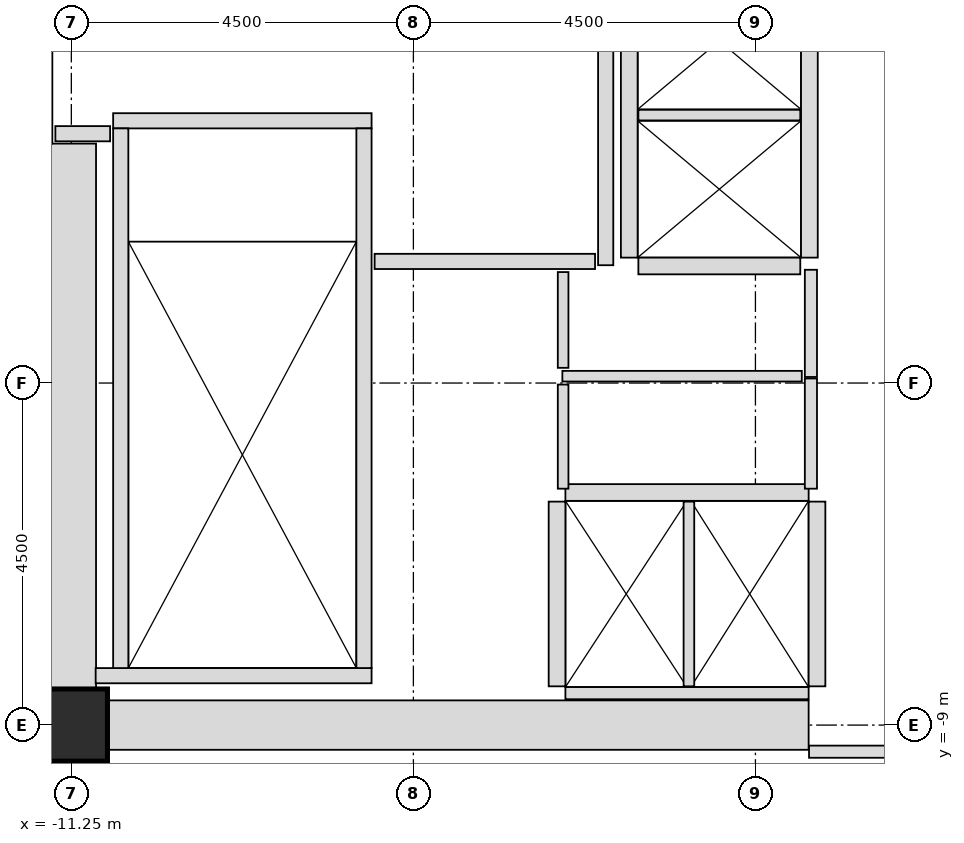
"""IFC4 building model, lengths in metres.
Left out: names, types, materials, properties, quantities, classifications, styles, units other than length and angle.
Written with IfcOpenShell. Run it as: python <this file> out.ifc"""

import sys

from ifc_helpers import new_model, si_unit, direction, frame, frame_2d, origin, origin_2d, place, context, subcontext, project, spatial, rectangle, hollow_rectangle, extrude, source, transform, mapped, element, fill, save


model = new_model("IFC4")
c1 = context("Model", 3, precision=1e-05, world=origin(), true_north=direction((0.0, 1.0)))
c2 = subcontext(c1, "Body", "Model", "MODEL_VIEW")
j1 = project(units=[si_unit("LENGTHUNIT", "METRE"), si_unit("PLANEANGLEUNIT", "RADIAN")], contexts=[c1])
p1 = place(None, origin())
s1 = spatial("IfcSite", under=j1, at=p1, CompositionType="ELEMENT")
p2 = place(p1, origin())
s2 = spatial("IfcBuilding", under=s1, at=p2, CompositionType="ELEMENT")
p3 = place(p2, frame((0.0, 0.0, 40.6)))
s3 = spatial("IfcBuildingStorey", under=s2, at=p3, CompositionType="ELEMENT", Elevation=40.6)
m1 = source(origin(), c2, "Body", "SweptSolid", [
    extrude(rectangle(XDim=10.025, YDim=0.65, at=frame_2d((5.012, 0.0))), origin(), (0.0, 0.0, 1.0), 3.8),
])
p4 = place(p3, frame((-11.575, -9.0, 0.0), z_axis=(0.0, 0.0, 1.0), x_axis=(1.0, 0.0, 0.0)))
e1 = element("IfcWall", 1, at=p4, inside=s3, PredefinedType="SHEAR", context=c2, shape_type="MappedRepresentation", body=[
    mapped(m1, transform((0.0, 0.0, 0.0), x_axis=(1.0, 0.0, 0.0), y_axis=(0.0, 1.0, 0.0), z_axis=(0.0, 0.0, 1.0), scale=1.0)),
])
m2 = source(origin(), c2, "Body", "SweptSolid", [
    extrude(rectangle(XDim=7.325, YDim=0.65, at=frame_2d((3.663, 0.0))), origin(), (0.0, 0.0, 1.0), 3.8),
])
p5 = place(p3, frame((-11.25, -8.675, 0.0), z_axis=(0.0, 0.0, 1.0), x_axis=(0.0, 1.0, 0.0)))
e2 = element("IfcWall", 2, at=p5, inside=s3, PredefinedType="SHEAR", context=c2, shape_type="MappedRepresentation", body=[
    mapped(m2, transform((0.0, 0.0, 0.0), x_axis=(1.0, 0.0, 0.0), y_axis=(0.0, 1.0, 0.0), z_axis=(0.0, 0.0, 1.0), scale=1.0)),
])
m3 = source(origin(), c2, "Body", "SweptSolid", [
    extrude(hollow_rectangle(XDim=0.95, YDim=0.95, WallThickness=0.045, InnerFilletRadius=0.045, OuterFilletRadius=0.09, at=origin_2d()), origin(), (0.0, 0.0, 1.0), 3.8),
])
p6 = place(p3, frame((-11.25, -9.0, 0.0), z_axis=(0.0, 0.0, 1.0), x_axis=(1.0, 0.0, 0.0)))
e3 = element("IfcColumn", 3, at=p6, inside=s3, PredefinedType="COLUMN", context=c2, shape_type="MappedRepresentation", body=[
    mapped(m3, transform((0.0, 0.0, 0.0), x_axis=(1.0, 0.0, 0.0), y_axis=(0.0, 1.0, 0.0), z_axis=(0.0, 0.0, 1.0), scale=1.0)),
])
m4 = source(origin(), c2, "Body", "SweptSolid", [
    extrude(rectangle(XDim=3.4, YDim=0.2, at=frame_2d((1.7, 0.0))), origin(), (0.0, 0.0, 1.0), 3.8),
])
p7 = place(p3, frame((-10.7, -1.05, 0.0), z_axis=(0.0, 0.0, 1.0), x_axis=(1.0, 0.0, 0.0)))
e4 = element("IfcWall", 4, at=p7, inside=s3, PredefinedType="SOLIDWALL", context=c2, shape_type="MappedRepresentation", body=[
    mapped(m4, transform((0.0, 0.0, 0.0), x_axis=(1.0, 0.0, 0.0), y_axis=(0.0, 1.0, 0.0), z_axis=(0.0, 0.0, 1.0), scale=1.0)),
])
m5 = source(origin(), c2, "Body", "SweptSolid", [
    extrude(rectangle(XDim=3.63, YDim=0.2, at=frame_2d((1.815, 0.0))), origin(), (0.0, 0.0, 1.0), 3.8),
])
p8 = place(p3, frame((-10.93, -8.35, 0.0), z_axis=(0.0, 0.0, 1.0), x_axis=(1.0, 0.0, 0.0)))
e5 = element("IfcWall", 5, at=p8, inside=s3, PredefinedType="SOLIDWALL", context=c2, shape_type="MappedRepresentation", body=[
    mapped(m5, transform((0.0, 0.0, 0.0), x_axis=(1.0, 0.0, 0.0), y_axis=(0.0, 1.0, 0.0), z_axis=(0.0, 0.0, 1.0), scale=1.0)),
])
m6 = source(origin(), c2, "Body", "SweptSolid", [
    extrude(rectangle(XDim=7.1, YDim=0.2, at=frame_2d((3.55, 0.0))), origin(), (0.0, 0.0, 1.0), 3.8),
])
p9 = place(p3, frame((-10.6, -1.15, 0.0), z_axis=(0.0, 0.0, 1.0), x_axis=(0.0, -1.0, 0.0)))
e6 = element("IfcWall", 6, at=p9, inside=s3, PredefinedType="SOLIDWALL", context=c2, shape_type="MappedRepresentation", body=[
    mapped(m6, transform((0.0, 0.0, 0.0), x_axis=(1.0, 0.0, 0.0), y_axis=(0.0, 1.0, 0.0), z_axis=(0.0, 0.0, 1.0), scale=1.0)),
])
p10 = place(p3, frame((-7.4, -1.15, 0.0), z_axis=(0.0, 0.0, 1.0), x_axis=(0.0, -1.0, 0.0)))
e7 = element("IfcWall", 7, at=p10, inside=s3, PredefinedType="SOLIDWALL", context=c2, shape_type="MappedRepresentation", body=[
    mapped(m6, transform((0.0, 0.0, 0.0), x_axis=(1.0, 0.0, 0.0), y_axis=(0.0, 1.0, 0.0), z_axis=(0.0, 0.0, 1.0), scale=1.0)),
])
p11 = place(p10, frame((0.18, 0.0, 0.0)))
e8 = element("IfcOpeningElement", 8, at=p11, cuts=e7, PredefinedType="OPENING", context=c2, shape_type="SweptSolid", body=[
    extrude(rectangle(XDim=1.1, YDim=2.15, at=frame_2d((0.55, 1.075))), frame((0.0, 0.11, 0.0), z_axis=(0.0, -1.0, 0.0), x_axis=(1.0, 0.0, 0.0)), (0.0, 0.0, 1.0), 0.22),
])
m7 = source(origin(), c2, "Body", "SweptSolid", [
    extrude(rectangle(XDim=3.2, YDim=0.22, at=frame_2d((1.6, 0.0))), origin(), (0.0, 0.0, 1.0), 3.535),
])
p12 = place(p3, frame((-1.55, -5.94, 0.0), z_axis=(0.0, 0.0, 1.0), x_axis=(-1.0, 0.0, 0.0)))
e9 = element("IfcWall", 9, at=p12, inside=s3, PredefinedType="SOLIDWALL", context=c2, shape_type="MappedRepresentation", body=[
    mapped(m7, transform((0.0, 0.0, 0.0), x_axis=(1.0, 0.0, 0.0), y_axis=(0.0, 1.0, 0.0), z_axis=(0.0, 0.0, 1.0), scale=1.0)),
])
m8 = source(origin(), c2, "Body", "SweptSolid", [
    extrude(rectangle(XDim=3.2, YDim=0.16, at=frame_2d((1.6, 0.0))), origin(), (0.0, 0.0, 1.0), 2.425),
])
p13 = place(p3, frame((-4.75, -8.58, 0.0), z_axis=(0.0, 0.0, 1.0), x_axis=(1.0, 0.0, 0.0)))
e10 = element("IfcWall", 10, at=p13, inside=s3, PredefinedType="PARTITIONING", context=c2, shape_type="MappedRepresentation", body=[
    mapped(m8, transform((0.0, 0.0, 0.0), x_axis=(1.0, 0.0, 0.0), y_axis=(0.0, 1.0, 0.0), z_axis=(0.0, 0.0, 1.0), scale=1.0)),
])
m9 = source(origin(), c2, "Body", "SweptSolid", [
    extrude(rectangle(XDim=2.43, YDim=0.22, at=frame_2d((1.215, 0.0))), origin(), (0.0, 0.0, 1.0), 3.535),
])
p14 = place(p3, frame((-4.86, -6.06, 0.0), z_axis=(0.0, 0.0, 1.0), x_axis=(0.0, -1.0, 0.0)))
e11 = element("IfcWall", 11, at=p14, inside=s3, PredefinedType="SOLIDWALL", context=c2, shape_type="MappedRepresentation", body=[
    mapped(m9, transform((0.0, 0.0, 0.0), x_axis=(1.0, 0.0, 0.0), y_axis=(0.0, 1.0, 0.0), z_axis=(0.0, 0.0, 1.0), scale=1.0)),
])
m10 = source(origin(), c2, "Body", "SweptSolid", [
    extrude(rectangle(XDim=2.43, YDim=0.14, at=frame_2d((1.215, 0.0))), origin(), (0.0, 0.0, 1.0), 3.535),
])
p15 = place(p3, frame((-3.125, -8.49, 0.0), z_axis=(0.0, 0.0, 1.0), x_axis=(0.0, 1.0, 0.0)))
e12 = element("IfcWall", 12, at=p15, inside=s3, PredefinedType="PARTITIONING", context=c2, shape_type="MappedRepresentation", body=[
    mapped(m10, transform((0.0, 0.0, 0.0), x_axis=(1.0, 0.0, 0.0), y_axis=(0.0, 1.0, 0.0), z_axis=(0.0, 0.0, 1.0), scale=1.0)),
])
p16 = place(p3, frame((-1.44, -8.49, 0.0), z_axis=(0.0, 0.0, 1.0), x_axis=(0.0, 1.0, 0.0)))
e13 = element("IfcWall", 13, at=p16, inside=s3, PredefinedType="SOLIDWALL", context=c2, shape_type="MappedRepresentation", body=[
    mapped(m9, transform((0.0, 0.0, 0.0), x_axis=(1.0, 0.0, 0.0), y_axis=(0.0, 1.0, 0.0), z_axis=(0.0, 0.0, 1.0), scale=1.0)),
])
m11 = source(origin(), c2, "Body", "SweptSolid", [
    extrude(rectangle(XDim=5.7, YDim=0.22, at=frame_2d((2.85, 0.0))), origin(), (0.0, 0.0, 1.0), 3.535),
])
for number, where, z_axis, x_axis in (
    (14, (-1.54, -2.85, 0.0), (0.0, 0.0, 1.0), (0.0, 1.0, 0.0)),
    (15, (-3.91, 2.85, 0.0), (0.0, 0.0, 1.0), (0.0, -1.0, 0.0)),
):
    element("IfcWall", number, at=place(p3, frame(where, z_axis=z_axis, x_axis=x_axis)), inside=s3, PredefinedType="SOLIDWALL", context=c2, shape_type="MappedRepresentation", body=[
        mapped(m11, transform((0.0, 0.0, 0.0), x_axis=(1.0, 0.0, 0.0), y_axis=(0.0, 1.0, 0.0), z_axis=(0.0, 0.0, 1.0), scale=1.0)),
    ])
m12 = source(origin(), c2, "Body", "SweptSolid", [
    extrude(rectangle(XDim=2.13, YDim=0.22, at=frame_2d((1.065, 0.0))), origin(), (0.0, 0.0, 1.0), 3.535),
])
p17 = place(p3, frame((-3.79, -2.96, 0.0), z_axis=(0.0, 0.0, 1.0), x_axis=(1.0, 0.0, 0.0)))
e16 = element("IfcWall", 16, at=p17, inside=s3, PredefinedType="SOLIDWALL", context=c2, shape_type="MappedRepresentation", body=[
    mapped(m12, transform((0.0, 0.0, 0.0), x_axis=(1.0, 0.0, 0.0), y_axis=(0.0, 1.0, 0.0), z_axis=(0.0, 0.0, 1.0), scale=1.0)),
])
m13 = source(origin(), c2, "Body", "SweptSolid", [
    extrude(rectangle(XDim=2.13, YDim=0.14, at=frame_2d((1.065, 0.0))), origin(), (0.0, 0.0, 1.0), 3.535),
])
p18 = place(p3, frame((-3.79, -0.975, 0.0), z_axis=(0.0, 0.0, 1.0), x_axis=(1.0, 0.0, 0.0)))
e17 = element("IfcWall", 17, at=p18, inside=s3, PredefinedType="PARTITIONING", context=c2, shape_type="MappedRepresentation", body=[
    mapped(m13, transform((0.0, 0.0, 0.0), x_axis=(1.0, 0.0, 0.0), y_axis=(0.0, 1.0, 0.0), z_axis=(0.0, 0.0, 1.0), scale=1.0)),
])
m14 = source(origin(), c2, "Body", "SweptSolid", [
    extrude(rectangle(XDim=5.9, YDim=0.2, at=frame_2d((2.95, 0.0))), origin(), (0.0, 0.0, 1.0), 3.535),
])
p19 = place(p3, frame((-4.22, -2.95, 0.0), z_axis=(0.0, 0.0, 1.0), x_axis=(0.0, 1.0, 0.0)))
e18 = element("IfcWall", 18, at=p19, inside=s3, PredefinedType="PARTITIONING", context=c2, shape_type="MappedRepresentation", body=[
    mapped(m14, transform((0.0, 0.0, 0.0), x_axis=(1.0, 0.0, 0.0), y_axis=(0.0, 1.0, 0.0), z_axis=(0.0, 0.0, 1.0), scale=1.0)),
])
m15 = source(origin(), c2, "Body", "SweptSolid", [
    extrude(rectangle(XDim=2.9, YDim=0.2, at=frame_2d((1.45, 0.0))), origin(), (0.0, 0.0, 1.0), 3.535),
])
p20 = place(p3, frame((-7.26, -2.9, 0.0), z_axis=(0.0, 0.0, 1.0), x_axis=(1.0, 0.0, 0.0)))
e19 = element("IfcWall", 19, at=p20, inside=s3, PredefinedType="PARTITIONING", context=c2, shape_type="MappedRepresentation", body=[
    mapped(m15, transform((0.0, 0.0, 0.0), x_axis=(1.0, 0.0, 0.0), y_axis=(0.0, 1.0, 0.0), z_axis=(0.0, 0.0, 1.0), scale=1.0)),
])
m16 = source(origin(), c2, "Body", "SweptSolid", [
    extrude(rectangle(XDim=0.72, YDim=0.2, at=frame_2d((0.36, 0.0))), origin(), (0.0, 0.0, 1.0), 3.535),
])
p21 = place(p3, frame((-11.46, -1.22, 0.0), z_axis=(0.0, 0.0, 1.0), x_axis=(1.0, 0.0, 0.0)))
e20 = element("IfcWall", 20, at=p21, inside=s3, PredefinedType="PARTITIONING", context=c2, shape_type="MappedRepresentation", body=[
    mapped(m16, transform((0.0, 0.0, 0.0), x_axis=(1.0, 0.0, 0.0), y_axis=(0.0, 1.0, 0.0), z_axis=(0.0, 0.0, 1.0), scale=1.0)),
])
m17 = source(origin(), c2, "Body", "SweptSolid", [
    extrude(rectangle(XDim=3.09, YDim=0.16, at=frame_2d((1.545, 0.0))), origin(), (0.0, 0.0, 1.0), 2.425),
])
p22 = place(p3, frame((-1.545, -9.35, 0.0), z_axis=(0.0, 0.0, 1.0), x_axis=(1.0, 0.0, 0.0)))
e21 = element("IfcWall", 21, at=p22, inside=s3, PredefinedType="PARTITIONING", context=c2, shape_type="MappedRepresentation", body=[
    mapped(m17, transform((0.0, 0.0, 0.0), x_axis=(1.0, 0.0, 0.0), y_axis=(0.0, 1.0, 0.0), z_axis=(0.0, 0.0, 1.0), scale=1.0)),
])
p23 = place(p22, frame((0.745, 0.0, 0.0)))
e22 = element("IfcOpeningElement", 22, at=p23, cuts=e21, PredefinedType="OPENING", context=c2, shape_type="SweptSolid", body=[
    extrude(rectangle(XDim=1.6, YDim=2.3, at=frame_2d((0.8, 1.15))), frame((0.0, 0.09, 0.0), z_axis=(0.0, -1.0, 0.0), x_axis=(1.0, 0.0, 0.0)), (0.0, 0.0, 1.0), 0.18),
])
m18 = source(origin(), c2, "Body", "SweptSolid", [
    extrude(rectangle(XDim=1.41, YDim=0.16, at=frame_2d((0.705, 0.0))), origin(), (0.0, 0.0, 1.0), 3.535),
])
p24 = place(p3, frame((-1.52, -4.42, 0.0), z_axis=(0.0, 0.0, 1.0), x_axis=(0.0, 1.0, 0.0)))
e23 = element("IfcWall", 23, at=p24, inside=s3, PredefinedType="PARTITIONING", context=c2, shape_type="MappedRepresentation", body=[
    mapped(m18, transform((0.0, 0.0, 0.0), x_axis=(1.0, 0.0, 0.0), y_axis=(0.0, 1.0, 0.0), z_axis=(0.0, 0.0, 1.0), scale=1.0)),
])
p25 = place(p24, frame((0.28, 0.0, 0.0)))
e24 = element("IfcOpeningElement", 24, at=p25, cuts=e23, PredefinedType="OPENING", context=c2, shape_type="SweptSolid", body=[
    extrude(rectangle(XDim=0.85, YDim=2.1, at=frame_2d((0.425, 1.05))), frame((0.0, 0.09, 0.0), z_axis=(0.0, -1.0, 0.0), x_axis=(1.0, 0.0, 0.0)), (0.0, 0.0, 1.0), 0.18),
])
m19 = source(origin(), c2, "Body", "SweptSolid", [
    extrude(rectangle(XDim=3.15, YDim=0.14, at=frame_2d((1.575, 0.0))), origin(), (0.0, 0.0, 1.0), 3.535),
])
p26 = place(p3, frame((-4.79, -4.41, 0.0), z_axis=(0.0, 0.0, 1.0), x_axis=(1.0, 0.0, 0.0)))
e25 = element("IfcWall", 25, at=p26, inside=s3, PredefinedType="PARTITIONING", context=c2, shape_type="MappedRepresentation", body=[
    mapped(m19, transform((0.0, 0.0, 0.0), x_axis=(1.0, 0.0, 0.0), y_axis=(0.0, 1.0, 0.0), z_axis=(0.0, 0.0, 1.0), scale=1.0)),
])
m20 = source(origin(), c2, "Body", "SweptSolid", [
    extrude(rectangle(XDim=1.26, YDim=0.14, at=frame_2d((0.63, 0.0))), origin(), (0.0, 0.0, 1.0), 3.535),
])
p27 = place(p3, frame((-4.78, -4.3, 0.0), z_axis=(0.0, 0.0, 1.0), x_axis=(0.0, 1.0, 0.0)))
e26 = element("IfcWall", 26, at=p27, inside=s3, PredefinedType="PARTITIONING", context=c2, shape_type="MappedRepresentation", body=[
    mapped(m20, transform((0.0, 0.0, 0.0), x_axis=(1.0, 0.0, 0.0), y_axis=(0.0, 1.0, 0.0), z_axis=(0.0, 0.0, 1.0), scale=1.0)),
])
m21 = source(origin(), c2, "Body", "SweptSolid", [
    extrude(rectangle(XDim=1.45, YDim=0.16, at=frame_2d((0.725, 0.0))), origin(), (0.0, 0.0, 1.0), 3.535),
])
p28 = place(p3, frame((-1.52, -5.89, 0.0), z_axis=(0.0, 0.0, 1.0), x_axis=(0.0, 1.0, 0.0)))
e27 = element("IfcWall", 27, at=p28, inside=s3, PredefinedType="PARTITIONING", context=c2, shape_type="MappedRepresentation", body=[
    mapped(m21, transform((0.0, 0.0, 0.0), x_axis=(1.0, 0.0, 0.0), y_axis=(0.0, 1.0, 0.0), z_axis=(0.0, 0.0, 1.0), scale=1.0)),
])
p29 = place(p28, frame((0.3, 0.0, 0.0)))
e28 = element("IfcOpeningElement", 28, at=p29, cuts=e27, PredefinedType="OPENING", context=c2, shape_type="SweptSolid", body=[
    extrude(rectangle(XDim=0.85, YDim=2.1, at=frame_2d((0.425, 1.05))), frame((0.0, 0.09, 0.0), z_axis=(0.0, -1.0, 0.0), x_axis=(1.0, 0.0, 0.0)), (0.0, 0.0, 1.0), 0.18),
])
m22 = source(origin(), c2, "Body", "SweptSolid", [
    extrude(rectangle(XDim=1.37, YDim=0.14, at=frame_2d((0.685, 0.0))), origin(), (0.0, 0.0, 1.0), 3.535),
])
p30 = place(p3, frame((-4.78, -5.89, 0.0), z_axis=(0.0, 0.0, 1.0), x_axis=(0.0, 1.0, 0.0)))
e29 = element("IfcWall", 29, at=p30, inside=s3, PredefinedType="PARTITIONING", context=c2, shape_type="MappedRepresentation", body=[
    mapped(m22, transform((0.0, 0.0, 0.0), x_axis=(1.0, 0.0, 0.0), y_axis=(0.0, 1.0, 0.0), z_axis=(0.0, 0.0, 1.0), scale=1.0)),
])
m23 = source(origin(), c2, "Body", "SweptSolid", [
    extrude(rectangle(XDim=1.1, YDim=2.15, at=frame_2d((0.55, 1.075))), frame((0.0, 0.025, 0.0), z_axis=(0.0, -1.0, 0.0), x_axis=(1.0, 0.0, 0.0)), (0.0, 0.0, 1.0), 0.05),
])
p31 = place(p11, origin())
e30 = element("IfcDoor", 30, at=p31, inside=s3, OperationType="SINGLE_SWING_RIGHT", PredefinedType="DOOR", context=c2, shape_type="MappedRepresentation", body=[
    mapped(m23, transform((0.0, 0.0, 0.0), x_axis=(1.0, 0.0, 0.0), y_axis=(0.0, 1.0, 0.0), z_axis=(0.0, 0.0, 1.0), scale=1.0)),
])
fill(e8, e30)
m24 = source(origin(), c2, "Body", "SweptSolid", [
    extrude(rectangle(XDim=1.6, YDim=2.3, at=frame_2d((0.8, 1.15))), frame((0.0, 0.025, 0.0), z_axis=(0.0, -1.0, 0.0), x_axis=(1.0, 0.0, 0.0)), (0.0, 0.0, 1.0), 0.05),
])
p32 = place(p23, origin())
e31 = element("IfcDoor", 31, at=p32, inside=s3, OperationType="DOUBLE_DOOR_SINGLE_SWING", PredefinedType="DOOR", context=c2, shape_type="MappedRepresentation", body=[
    mapped(m24, transform((0.0, 0.0, 0.0), x_axis=(1.0, 0.0, 0.0), y_axis=(0.0, 1.0, 0.0), z_axis=(0.0, 0.0, 1.0), scale=1.0)),
])
fill(e22, e31)
m25 = source(origin(), c2, "Body", "SweptSolid", [
    extrude(rectangle(XDim=0.85, YDim=2.1, at=frame_2d((0.425, 1.05))), frame((0.0, 0.025, 0.0), z_axis=(0.0, -1.0, 0.0), x_axis=(1.0, 0.0, 0.0)), (0.0, 0.0, 1.0), 0.05),
])
p33 = place(p25, origin())
e32 = element("IfcDoor", 32, at=p33, inside=s3, OperationType="SINGLE_SWING_RIGHT", PredefinedType="DOOR", context=c2, shape_type="MappedRepresentation", body=[
    mapped(m25, transform((0.0, 0.0, 0.0), x_axis=(1.0, 0.0, 0.0), y_axis=(0.0, 1.0, 0.0), z_axis=(0.0, 0.0, 1.0), scale=1.0)),
])
fill(e24, e32)
p34 = place(p29, origin())
e33 = element("IfcDoor", 33, at=p34, inside=s3, OperationType="SINGLE_SWING_LEFT", PredefinedType="DOOR", context=c2, shape_type="MappedRepresentation", body=[
    mapped(m25, transform((0.0, 0.0, 0.0), x_axis=(1.0, 0.0, 0.0), y_axis=(0.0, 1.0, 0.0), z_axis=(0.0, 0.0, 1.0), scale=1.0)),
])
fill(e28, e33)
save(model, sys.argv[1])
